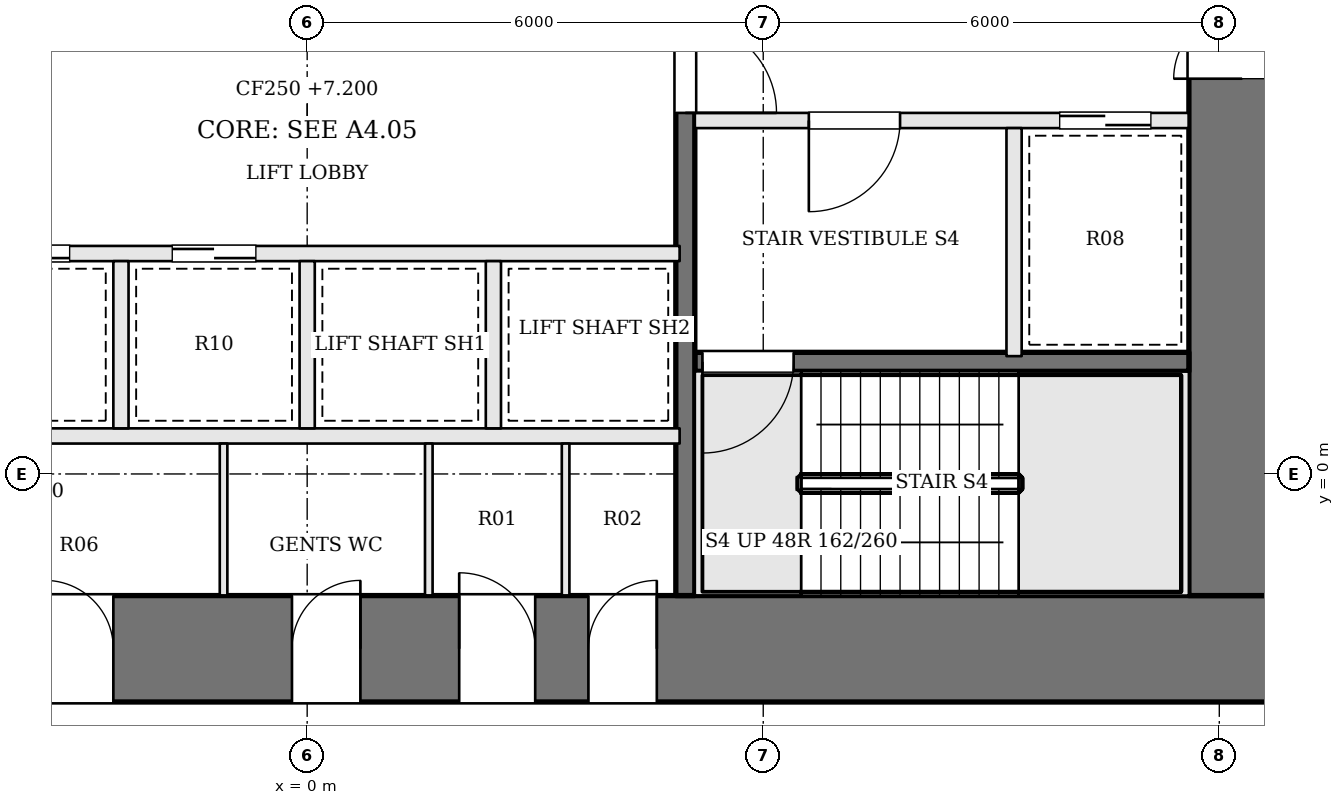
"""IFC4 building model, lengths in metres.
Left out: names, types, materials, properties, quantities, classifications, styles, units other than length and angle.
Written with IfcOpenShell. Run it as: python <this file> out.ifc"""

import sys

from ifc_helpers import new_model, si_unit, direction, frame, frame_2d, origin, place, context, subcontext, project, spatial, rectangle, extrude, element, fill, save


model = new_model("IFC4")
c1 = context("Model", 3, precision=1e-05, world=origin(), true_north=direction((0.0, 1.0)))
c2 = subcontext(c1, "Body", "Model", "MODEL_VIEW")
j1 = project(units=[si_unit("LENGTHUNIT", "METRE"), si_unit("PLANEANGLEUNIT", "RADIAN")], contexts=[c1])
p1 = place(None, origin())
s1 = spatial("IfcSite", under=j1, at=p1, CompositionType="ELEMENT")
p2 = place(p1, origin())
s2 = spatial("IfcBuilding", under=s1, at=p2, CompositionType="ELEMENT")
p3 = place(p2, frame((0.0, 0.0, 7.2)))
s3 = spatial("IfcBuildingStorey", under=s2, at=p3, CompositionType="ELEMENT", Elevation=7.2)
p4 = place(p3, frame((-13.0, -2.3, 0.0), z_axis=(0.0, 0.0, 1.0), x_axis=(1.0, 0.0, 0.0)))
e1 = element("IfcWall", 1, at=p4, inside=s3, PredefinedType="SHEAR", context=c2, shape_type="SweptSolid", body=[
    extrude(rectangle(XDim=26.0, YDim=1.4, at=frame_2d((13.0, 0.0))), origin(), (0.0, 0.0, 1.0), 7.8),
])
p5 = place(p4, frame((9.55, 0.0, 0.0)))
e2 = element("IfcOpeningElement", 2, at=p5, cuts=e1, PredefinedType="OPENING", context=c2, shape_type="SweptSolid", body=[
    extrude(rectangle(XDim=0.9, YDim=2.1, at=frame_2d((0.45, 1.05))), frame((0.0, 0.71, 0.0), z_axis=(0.0, -1.0, 0.0), x_axis=(1.0, 0.0, 0.0)), (0.0, 0.0, 1.0), 1.42),
])
p6 = place(p4, frame((12.8, 0.0, 0.0)))
e3 = element("IfcOpeningElement", 3, at=p6, cuts=e1, PredefinedType="OPENING", context=c2, shape_type="SweptSolid", body=[
    extrude(rectangle(XDim=0.9, YDim=2.1, at=frame_2d((0.45, 1.05))), frame((0.0, 0.71, 0.0), z_axis=(0.0, -1.0, 0.0), x_axis=(1.0, 0.0, 0.0)), (0.0, 0.0, 1.0), 1.42),
])
p7 = place(p4, frame((15.0, 0.0, 0.0)))
e4 = element("IfcOpeningElement", 4, at=p7, cuts=e1, PredefinedType="OPENING", context=c2, shape_type="SweptSolid", body=[
    extrude(rectangle(XDim=1.0, YDim=2.1, at=frame_2d((0.5, 1.05))), frame((0.0, 0.71, 0.0), z_axis=(0.0, -1.0, 0.0), x_axis=(1.0, 0.0, 0.0)), (0.0, 0.0, 1.0), 1.42),
])
p8 = place(p4, frame((16.7, 0.0, 0.0)))
e5 = element("IfcOpeningElement", 5, at=p8, cuts=e1, PredefinedType="OPENING", context=c2, shape_type="SweptSolid", body=[
    extrude(rectangle(XDim=0.9, YDim=2.1, at=frame_2d((0.45, 1.05))), frame((0.0, 0.71, 0.0), z_axis=(0.0, -1.0, 0.0), x_axis=(1.0, 0.0, 0.0)), (0.0, 0.0, 1.0), 1.42),
])
p9 = place(p3, frame((12.3, -1.6, 0.0), z_axis=(0.0, 0.0, 1.0), x_axis=(0.0, 1.0, 0.0)))
e6 = element("IfcWall", 6, at=p9, inside=s3, PredefinedType="SHEAR", context=c2, shape_type="SweptSolid", body=[
    extrude(rectangle(XDim=12.2, YDim=1.4, at=frame_2d((6.1, 0.0))), origin(), (0.0, 0.0, 1.0), 7.8),
])
p10 = place(p9, frame((6.8, 0.0, 0.0)))
e7 = element("IfcOpeningElement", 7, at=p10, cuts=e6, PredefinedType="OPENING", context=c2, shape_type="SweptSolid", body=[
    extrude(rectangle(XDim=1.8, YDim=2.1, at=frame_2d((0.9, 1.05))), frame((0.0, 0.71, 0.0), z_axis=(0.0, -1.0, 0.0), x_axis=(1.0, 0.0, 0.0)), (0.0, 0.0, 1.0), 1.42),
])
p11 = place(p3, frame((11.6, 4.65, 0.0), z_axis=(0.0, 0.0, 1.0), x_axis=(-1.0, 0.0, 0.0)))
e8 = element("IfcWall", 8, at=p11, inside=s3, PredefinedType="SOLIDWALL", context=c2, shape_type="SweptSolid", body=[
    extrude(rectangle(XDim=6.5, YDim=0.2, at=frame_2d((3.25, 0.0))), origin(), (0.0, 0.0, 1.0), 7.55),
])
p12 = place(p11, frame((3.8, 0.0, 0.0)))
e9 = element("IfcOpeningElement", 9, at=p12, cuts=e8, PredefinedType="OPENING", context=c2, shape_type="SweptSolid", body=[
    extrude(rectangle(XDim=1.2, YDim=2.1, at=frame_2d((0.6, 1.05))), frame((0.0, 0.11, 0.0), z_axis=(0.0, -1.0, 0.0), x_axis=(1.0, 0.0, 0.0)), (0.0, 0.0, 1.0), 0.22),
])
p13 = place(p11, frame((0.5, 0.0, 0.0)))
e10 = element("IfcOpeningElement", 10, at=p13, cuts=e8, PredefinedType="OPENING", context=c2, shape_type="SweptSolid", body=[
    extrude(rectangle(XDim=1.2, YDim=2.1, at=frame_2d((0.6, 1.05))), frame((0.0, 0.11, 0.0), z_axis=(0.0, -1.0, 0.0), x_axis=(1.0, 0.0, 0.0)), (0.0, 0.0, 1.0), 0.22),
])
p14 = place(p3, frame((11.6, 1.475, 0.0), z_axis=(0.0, 0.0, 1.0), x_axis=(-1.0, 0.0, 0.0)))
e11 = element("IfcWall", 11, at=p14, inside=s3, PredefinedType="SOLIDWALL", context=c2, shape_type="SweptSolid", body=[
    extrude(rectangle(XDim=6.5, YDim=0.25, at=frame_2d((3.25, 0.0))), origin(), (0.0, 0.0, 1.0), 7.55),
])
p15 = place(p14, frame((5.2, 0.0, 0.0)))
e12 = element("IfcOpeningElement", 12, at=p15, cuts=e11, PredefinedType="OPENING", context=c2, shape_type="SweptSolid", body=[
    extrude(rectangle(XDim=1.2, YDim=2.1, at=frame_2d((0.6, 1.05))), frame((0.0, 0.135, 0.0), z_axis=(0.0, -1.0, 0.0), x_axis=(1.0, 0.0, 0.0)), (0.0, 0.0, 1.0), 0.27),
])
p16 = place(p3, frame((9.3, 4.55, 0.0), z_axis=(0.0, 0.0, 1.0), x_axis=(0.0, -1.0, 0.0)))
e13 = element("IfcWall", 13, at=p16, inside=s3, PredefinedType="SOLIDWALL", context=c2, shape_type="SweptSolid", body=[
    extrude(rectangle(XDim=3.0, YDim=0.2, at=frame_2d((1.5, 0.0))), origin(), (0.0, 0.0, 1.0), 7.55),
])
p17 = place(p3, frame((4.975, 10.6, 0.0), z_axis=(0.0, 0.0, 1.0), x_axis=(0.0, -1.0, 0.0)))
e14 = element("IfcWall", 14, at=p17, inside=s3, PredefinedType="SOLIDWALL", context=c2, shape_type="SweptSolid", body=[
    extrude(rectangle(XDim=12.2, YDim=0.25, at=frame_2d((6.1, 0.0))), origin(), (0.0, 0.0, 1.0), 7.55),
])
p18 = place(p17, frame((4.65, 0.0, 0.0)))
e15 = element("IfcOpeningElement", 15, at=p18, cuts=e14, PredefinedType="OPENING", context=c2, shape_type="SweptSolid", body=[
    extrude(rectangle(XDim=1.2, YDim=2.1, at=frame_2d((0.6, 1.05))), frame((0.0, 0.135, 0.0), z_axis=(0.0, -1.0, 0.0), x_axis=(1.0, 0.0, 0.0)), (0.0, 0.0, 1.0), 0.27),
])
p19 = place(p3, frame((-4.9, 0.5, 0.0), z_axis=(0.0, 0.0, 1.0), x_axis=(1.0, 0.0, 0.0)))
e16 = element("IfcWall", 16, at=p19, inside=s3, PredefinedType="SOLIDWALL", context=c2, shape_type="SweptSolid", body=[
    extrude(rectangle(XDim=9.8, YDim=0.2, at=frame_2d((4.9, 0.0))), origin(), (0.0, 0.0, 1.0), 7.55),
])
p20 = place(p3, frame((-4.9, 2.9, 0.0), z_axis=(0.0, 0.0, 1.0), x_axis=(1.0, 0.0, 0.0)))
e17 = element("IfcWall", 17, at=p20, inside=s3, PredefinedType="SOLIDWALL", context=c2, shape_type="SweptSolid", body=[
    extrude(rectangle(XDim=9.8, YDim=0.2, at=frame_2d((4.9, 0.0))), origin(), (0.0, 0.0, 1.0), 7.55),
])
p21 = place(p20, frame((0.675, 0.0, 0.0)))
e18 = element("IfcOpeningElement", 18, at=p21, cuts=e17, PredefinedType="OPENING", context=c2, shape_type="SweptSolid", body=[
    extrude(rectangle(XDim=1.1, YDim=2.1, at=frame_2d((0.55, 1.05))), frame((0.0, 0.11, 0.0), z_axis=(0.0, -1.0, 0.0), x_axis=(1.0, 0.0, 0.0)), (0.0, 0.0, 1.0), 0.22),
])
p22 = place(p20, frame((3.125, 0.0, 0.0)))
e19 = element("IfcOpeningElement", 19, at=p22, cuts=e17, PredefinedType="OPENING", context=c2, shape_type="SweptSolid", body=[
    extrude(rectangle(XDim=1.1, YDim=2.1, at=frame_2d((0.55, 1.05))), frame((0.0, 0.11, 0.0), z_axis=(0.0, -1.0, 0.0), x_axis=(1.0, 0.0, 0.0)), (0.0, 0.0, 1.0), 0.22),
])
for number, where, z_axis, x_axis in (
    (20, (-2.45, 0.6, 0.0), (0.0, 0.0, 1.0), (0.0, 1.0, 0.0)),
    (21, (0.0, 0.6, 0.0), (0.0, 0.0, 1.0), (0.0, 1.0, 0.0)),
    (22, (2.45, 0.6, 0.0), (0.0, 0.0, 1.0), (0.0, 1.0, 0.0)),
):
    element("IfcWall", number, at=place(p3, frame(where, z_axis=z_axis, x_axis=x_axis)), inside=s3, PredefinedType="SOLIDWALL", context=c2, shape_type="SweptSolid", body=[
        extrude(rectangle(XDim=2.2, YDim=0.2, at=frame_2d((1.1, 0.0))), origin(), (0.0, 0.0, 1.0), 7.55),
    ])
for number, where, z_axis, x_axis in (
    (23, (-1.1, -1.6, 0.0), (0.0, 0.0, 1.0), (0.0, 1.0, 0.0)),
    (24, (1.6, -1.6, 0.0), (0.0, 0.0, 1.0), (0.0, 1.0, 0.0)),
    (25, (3.4, -1.6, 0.0), (0.0, 0.0, 1.0), (0.0, 1.0, 0.0)),
):
    element("IfcWall", number, at=place(p3, frame(where, z_axis=z_axis, x_axis=x_axis)), inside=s3, PredefinedType="PARTITIONING", context=c2, shape_type="SweptSolid", body=[
        extrude(rectangle(XDim=2.0, YDim=0.1, at=frame_2d((1.0, 0.0))), origin(), (0.0, 0.0, 1.0), 7.55),
    ])
p23 = place(p10, origin())
e26 = element("IfcDoor", 26, at=p23, inside=s3, OperationType="DOUBLE_DOOR_SINGLE_SWING", PredefinedType="DOOR", context=c2, shape_type="SweptSolid", body=[
    extrude(rectangle(XDim=1.8, YDim=2.1, at=frame_2d((0.9, 1.05))), frame((0.0, 0.025, 0.0), z_axis=(0.0, -1.0, 0.0), x_axis=(1.0, 0.0, 0.0)), (0.0, 0.0, 1.0), 0.05),
])
fill(e7, e26)
p24 = place(p18, origin())
e27 = element("IfcDoor", 27, at=p24, inside=s3, OperationType="SINGLE_SWING_RIGHT", PredefinedType="DOOR", context=c2, shape_type="SweptSolid", body=[
    extrude(rectangle(XDim=1.2, YDim=2.1, at=frame_2d((0.6, 1.05))), frame((0.0, 0.025, 0.0), z_axis=(0.0, -1.0, 0.0), x_axis=(1.0, 0.0, 0.0)), (0.0, 0.0, 1.0), 0.05),
])
fill(e15, e27)
p25 = place(p12, origin())
e28 = element("IfcDoor", 28, at=p25, inside=s3, OperationType="SINGLE_SWING_RIGHT", PredefinedType="DOOR", context=c2, shape_type="SweptSolid", body=[
    extrude(rectangle(XDim=1.2, YDim=2.1, at=frame_2d((0.6, 1.05))), frame((0.0, 0.025, 0.0), z_axis=(0.0, -1.0, 0.0), x_axis=(1.0, 0.0, 0.0)), (0.0, 0.0, 1.0), 0.05),
])
fill(e9, e28)
p26 = place(p15, origin())
e29 = element("IfcDoor", 29, at=p26, inside=s3, OperationType="SINGLE_SWING_RIGHT", PredefinedType="DOOR", context=c2, shape_type="SweptSolid", body=[
    extrude(rectangle(XDim=1.2, YDim=2.1, at=frame_2d((0.6, 1.05))), frame((0.0, 0.025, 0.0), z_axis=(0.0, -1.0, 0.0), x_axis=(1.0, 0.0, 0.0)), (0.0, 0.0, 1.0), 0.05),
])
fill(e12, e29)
p27 = place(p13, origin())
e30 = element("IfcDoor", 30, at=p27, inside=s3, OperationType="SLIDING_TO_RIGHT", PredefinedType="DOOR", context=c2, shape_type="SweptSolid", body=[
    extrude(rectangle(XDim=1.2, YDim=2.1, at=frame_2d((0.6, 1.05))), frame((0.0, 0.025, 0.0), z_axis=(0.0, -1.0, 0.0), x_axis=(1.0, 0.0, 0.0)), (0.0, 0.0, 1.0), 0.05),
])
fill(e10, e30)
p28 = place(p21, origin())
e31 = element("IfcDoor", 31, at=p28, inside=s3, OperationType="SLIDING_TO_RIGHT", PredefinedType="DOOR", context=c2, shape_type="SweptSolid", body=[
    extrude(rectangle(XDim=1.1, YDim=2.1, at=frame_2d((0.55, 1.05))), frame((0.0, 0.025, 0.0), z_axis=(0.0, -1.0, 0.0), x_axis=(1.0, 0.0, 0.0)), (0.0, 0.0, 1.0), 0.05),
])
fill(e18, e31)
p29 = place(p22, origin())
e32 = element("IfcDoor", 32, at=p29, inside=s3, OperationType="SLIDING_TO_LEFT", PredefinedType="DOOR", context=c2, shape_type="SweptSolid", body=[
    extrude(rectangle(XDim=1.1, YDim=2.1, at=frame_2d((0.55, 1.05))), frame((0.0, 0.025, 0.0), z_axis=(0.0, -1.0, 0.0), x_axis=(1.0, 0.0, 0.0)), (0.0, 0.0, 1.0), 0.05),
])
fill(e19, e32)
p30 = place(p5, origin())
e33 = element("IfcDoor", 33, at=p30, inside=s3, OperationType="SINGLE_SWING_LEFT", PredefinedType="DOOR", context=c2, shape_type="SweptSolid", body=[
    extrude(rectangle(XDim=0.9, YDim=2.1, at=frame_2d((0.45, 1.05))), frame((0.0, 0.025, 0.0), z_axis=(0.0, -1.0, 0.0), x_axis=(1.0, 0.0, 0.0)), (0.0, 0.0, 1.0), 0.05),
])
fill(e2, e33)
p31 = place(p6, origin())
e34 = element("IfcDoor", 34, at=p31, inside=s3, OperationType="SINGLE_SWING_RIGHT", PredefinedType="DOOR", context=c2, shape_type="SweptSolid", body=[
    extrude(rectangle(XDim=0.9, YDim=2.1, at=frame_2d((0.45, 1.05))), frame((0.0, 0.025, 0.0), z_axis=(0.0, -1.0, 0.0), x_axis=(1.0, 0.0, 0.0)), (0.0, 0.0, 1.0), 0.05),
])
fill(e3, e34)
p32 = place(p7, origin())
e35 = element("IfcDoor", 35, at=p32, inside=s3, OperationType="SINGLE_SWING_LEFT", PredefinedType="DOOR", context=c2, shape_type="SweptSolid", body=[
    extrude(rectangle(XDim=1.0, YDim=2.1, at=frame_2d((0.5, 1.05))), frame((0.0, 0.025, 0.0), z_axis=(0.0, -1.0, 0.0), x_axis=(1.0, 0.0, 0.0)), (0.0, 0.0, 1.0), 0.05),
])
fill(e4, e35)
p33 = place(p8, origin())
e36 = element("IfcDoor", 36, at=p33, inside=s3, OperationType="SINGLE_SWING_RIGHT", PredefinedType="DOOR", context=c2, shape_type="SweptSolid", body=[
    extrude(rectangle(XDim=0.9, YDim=2.1, at=frame_2d((0.45, 1.05))), frame((0.0, 0.025, 0.0), z_axis=(0.0, -1.0, 0.0), x_axis=(1.0, 0.0, 0.0)), (0.0, 0.0, 1.0), 0.05),
])
fill(e5, e36)
save(model, sys.argv[1])
